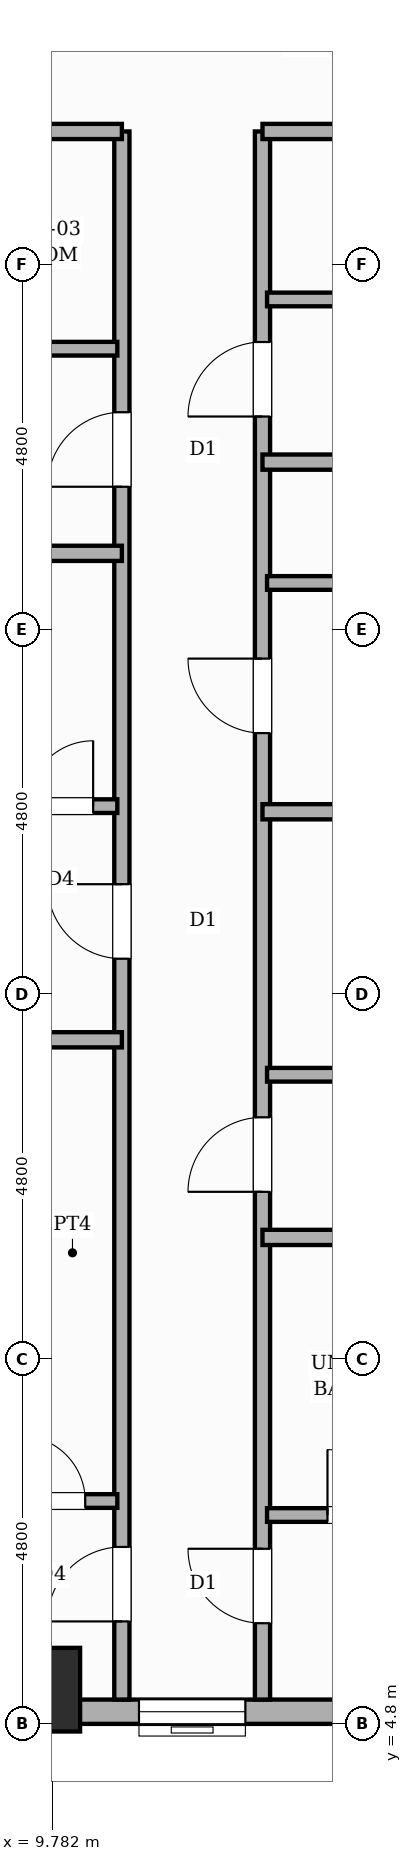
"""IFC4 building model, lengths in metres.
Left out: names, types, materials, properties, quantities, classifications, styles, units other than length and angle.
Written with IfcOpenShell. Run it as: python <this file> out.ifc"""

import sys

from ifc_helpers import new_model, si_unit, direction, frame, frame_2d, origin, origin_2d, place, context, subcontext, project, spatial, rectangle, extrude, element, fill, save


model = new_model("IFC4")
c1 = context("Model", 3, precision=1e-05, world=origin(), true_north=direction((0.0, 1.0)))
c2 = subcontext(c1, "Body", "Model", "MODEL_VIEW")
j1 = project(units=[si_unit("LENGTHUNIT", "METRE"), si_unit("PLANEANGLEUNIT", "RADIAN")], contexts=[c1])
p1 = place(None, origin())
s1 = spatial("IfcSite", under=j1, at=p1, CompositionType="ELEMENT")
p2 = place(p1, origin())
s2 = spatial("IfcBuilding", under=s1, at=p2, CompositionType="ELEMENT")
p3 = place(p2, frame((0.0, 0.0, 35.8)))
s3 = spatial("IfcBuildingStorey", under=s2, at=p3, CompositionType="ELEMENT", Elevation=35.8)
p4 = place(p3, frame((9.6, 5.25, 0.0), z_axis=(0.0, 0.0, 1.0), x_axis=(1.0, 0.0, 0.0)))
e1 = element("IfcColumn", 1, at=p4, inside=s3, PredefinedType="COLUMN", context=c2, shape_type="SweptSolid", body=[
    extrude(rectangle(XDim=1.1, YDim=1.1, at=origin_2d()), origin(), (0.0, 0.0, 1.0), 3.6),
])
p5 = place(p3, frame((21.6, 4.96, 0.0), z_axis=(0.0, 0.0, 1.0), x_axis=(-1.0, 0.0, 0.0)))
e2 = element("IfcWall", 2, at=p5, inside=s3, PredefinedType="STANDARD", context=c2, shape_type="SweptSolid", body=[
    extrude(rectangle(XDim=14.4, YDim=0.32, at=frame_2d((7.2, 0.0))), origin(), (0.0, 0.0, 1.0), 2.53),
])
p6 = place(p5, frame((12.98, 0.0, 0.45)))
e3 = element("IfcOpeningElement", 3, at=p6, cuts=e2, PredefinedType="OPENING", context=c2, shape_type="SweptSolid", body=[
    extrude(rectangle(XDim=0.95, YDim=1.8, at=frame_2d((0.475, 0.9))), frame((0.0, 0.17, 0.0), z_axis=(0.0, -1.0, 0.0), x_axis=(1.0, 0.0, 0.0)), (0.0, 0.0, 1.0), 0.34),
])
p7 = place(p5, frame((9.275, 0.0, 0.65)))
e4 = element("IfcOpeningElement", 4, at=p7, cuts=e2, PredefinedType="OPENING", context=c2, shape_type="SweptSolid", body=[
    extrude(rectangle(XDim=1.4, YDim=1.1, at=frame_2d((0.7, 0.55))), frame((0.0, 0.17, 0.0), z_axis=(0.0, -1.0, 0.0), x_axis=(1.0, 0.0, 0.0)), (0.0, 0.0, 1.0), 0.34),
])
p8 = place(p5, frame((4.812, 0.0, 0.65)))
e5 = element("IfcOpeningElement", 5, at=p8, cuts=e2, PredefinedType="OPENING", context=c2, shape_type="SweptSolid", body=[
    extrude(rectangle(XDim=1.4, YDim=1.1, at=frame_2d((0.7, 0.55))), frame((0.0, 0.17, 0.0), z_axis=(0.0, -1.0, 0.0), x_axis=(1.0, 0.0, 0.0)), (0.0, 0.0, 1.0), 0.34),
])
p9 = place(p5, frame((0.47, 0.0, 0.45)))
e6 = element("IfcOpeningElement", 6, at=p9, cuts=e2, PredefinedType="OPENING", context=c2, shape_type="SweptSolid", body=[
    extrude(rectangle(XDim=0.95, YDim=1.8, at=frame_2d((0.475, 0.9))), frame((0.0, 0.17, 0.0), z_axis=(0.0, -1.0, 0.0), x_axis=(1.0, 0.0, 0.0)), (0.0, 0.0, 1.0), 0.34),
])
p10 = place(p3, frame((10.7, 5.12, 0.0), z_axis=(0.0, 0.0, 1.0), x_axis=(0.0, 1.0, 0.0)))
e7 = element("IfcWall", 7, at=p10, inside=s3, PredefinedType="PARTITIONING", context=c2, shape_type="SweptSolid", body=[
    extrude(rectangle(XDim=20.63, YDim=0.2, at=frame_2d((10.315, 0.0))), origin(), (0.0, 0.0, 1.0), 3.35),
])
p11 = place(p10, frame((1.028, 0.0, 0.0)))
e8 = element("IfcOpeningElement", 8, at=p11, cuts=e7, PredefinedType="OPENING", context=c2, shape_type="SweptSolid", body=[
    extrude(rectangle(XDim=0.98, YDim=2.18, at=frame_2d((0.49, 1.09))), frame((0.0, 0.11, 0.0), z_axis=(0.0, -1.0, 0.0), x_axis=(1.0, 0.0, 0.0)), (0.0, 0.0, 1.0), 0.22),
])
p12 = place(p10, frame((9.747, 0.0, 0.0)))
e9 = element("IfcOpeningElement", 9, at=p12, cuts=e7, PredefinedType="OPENING", context=c2, shape_type="SweptSolid", body=[
    extrude(rectangle(XDim=0.98, YDim=2.18, at=frame_2d((0.49, 1.09))), frame((0.0, 0.11, 0.0), z_axis=(0.0, -1.0, 0.0), x_axis=(1.0, 0.0, 0.0)), (0.0, 0.0, 1.0), 0.22),
])
p13 = place(p10, frame((15.956, 0.0, 0.0)))
e10 = element("IfcOpeningElement", 10, at=p13, cuts=e7, PredefinedType="OPENING", context=c2, shape_type="SweptSolid", body=[
    extrude(rectangle(XDim=0.98, YDim=2.18, at=frame_2d((0.49, 1.09))), frame((0.0, 0.11, 0.0), z_axis=(0.0, -1.0, 0.0), x_axis=(1.0, 0.0, 0.0)), (0.0, 0.0, 1.0), 0.22),
])
p14 = place(p3, frame((12.55, 5.12, 0.0), z_axis=(0.0, 0.0, 1.0), x_axis=(0.0, 1.0, 0.0)))
e11 = element("IfcWall", 11, at=p14, inside=s3, PredefinedType="PARTITIONING", context=c2, shape_type="SweptSolid", body=[
    extrude(rectangle(XDim=20.63, YDim=0.2, at=frame_2d((10.315, 0.0))), origin(), (0.0, 0.0, 1.0), 3.35),
])
p15 = place(p14, frame((1.004, 0.0, 0.0)))
e12 = element("IfcOpeningElement", 12, at=p15, cuts=e11, PredefinedType="OPENING", context=c2, shape_type="SweptSolid", body=[
    extrude(rectangle(XDim=0.98, YDim=2.18, at=frame_2d((0.49, 1.09))), frame((0.0, 0.11, 0.0), z_axis=(0.0, -1.0, 0.0), x_axis=(1.0, 0.0, 0.0)), (0.0, 0.0, 1.0), 0.22),
])
p16 = place(p14, frame((6.68, 0.0, 0.0)))
e13 = element("IfcOpeningElement", 13, at=p16, cuts=e11, PredefinedType="OPENING", context=c2, shape_type="SweptSolid", body=[
    extrude(rectangle(XDim=0.98, YDim=2.18, at=frame_2d((0.49, 1.09))), frame((0.0, 0.11, 0.0), z_axis=(0.0, -1.0, 0.0), x_axis=(1.0, 0.0, 0.0)), (0.0, 0.0, 1.0), 0.22),
])
p17 = place(p14, frame((12.715, 0.0, 0.0)))
e14 = element("IfcOpeningElement", 14, at=p17, cuts=e11, PredefinedType="OPENING", context=c2, shape_type="SweptSolid", body=[
    extrude(rectangle(XDim=0.98, YDim=2.18, at=frame_2d((0.49, 1.09))), frame((0.0, 0.11, 0.0), z_axis=(0.0, -1.0, 0.0), x_axis=(1.0, 0.0, 0.0)), (0.0, 0.0, 1.0), 0.22),
])
p18 = place(p14, frame((16.88, 0.0, 0.0)))
e15 = element("IfcOpeningElement", 15, at=p18, cuts=e11, PredefinedType="OPENING", context=c2, shape_type="SweptSolid", body=[
    extrude(rectangle(XDim=0.98, YDim=2.18, at=frame_2d((0.49, 1.09))), frame((0.0, 0.11, 0.0), z_axis=(0.0, -1.0, 0.0), x_axis=(1.0, 0.0, 0.0)), (0.0, 0.0, 1.0), 0.22),
])
p19 = place(p3, frame((5.12, 25.75, 0.0), z_axis=(0.0, 0.0, 1.0), x_axis=(1.0, 0.0, 0.0)))
e16 = element("IfcWall", 16, at=p19, inside=s3, PredefinedType="PARTITIONING", context=c2, shape_type="SweptSolid", body=[
    extrude(rectangle(XDim=5.58, YDim=0.2, at=frame_2d((2.79, 0.0))), origin(), (0.0, 0.0, 1.0), 3.35),
])
p20 = place(p3, frame((12.55, 25.75, 0.0), z_axis=(0.0, 0.0, 1.0), x_axis=(1.0, 0.0, 0.0)))
e17 = element("IfcWall", 17, at=p20, inside=s3, PredefinedType="PARTITIONING", context=c2, shape_type="SweptSolid", body=[
    extrude(rectangle(XDim=11.13, YDim=0.2, at=frame_2d((5.565, 0.0))), origin(), (0.0, 0.0, 1.0), 3.35),
])
p21 = place(p3, frame((5.12, 7.732, 0.0), z_axis=(0.0, 0.0, 1.0), x_axis=(1.0, 0.0, 0.0)))
e18 = element("IfcWall", 18, at=p21, inside=s3, PredefinedType="PLUMBINGWALL", context=c2, shape_type="SweptSolid", body=[
    extrude(rectangle(XDim=5.52, YDim=0.18, at=frame_2d((2.76, 0.0))), origin(), (0.0, 0.0, 1.0), 3.35),
])
p22 = place(p21, frame((0.937, 0.0, 0.0)))
e19 = element("IfcOpeningElement", 19, at=p22, cuts=e18, PredefinedType="OPENING", context=c2, shape_type="SweptSolid", body=[
    extrude(rectangle(XDim=0.9, YDim=2.15, at=frame_2d((0.45, 1.075))), frame((0.0, 0.1, 0.0), z_axis=(0.0, -1.0, 0.0), x_axis=(1.0, 0.0, 0.0)), (0.0, 0.0, 1.0), 0.2),
])
p23 = place(p21, frame((2.564, 0.0, 0.0)))
e20 = element("IfcOpeningElement", 20, at=p23, cuts=e18, PredefinedType="OPENING", context=c2, shape_type="SweptSolid", body=[
    extrude(rectangle(XDim=0.9, YDim=2.15, at=frame_2d((0.45, 1.075))), frame((0.0, 0.1, 0.0), z_axis=(0.0, -1.0, 0.0), x_axis=(1.0, 0.0, 0.0)), (0.0, 0.0, 1.0), 0.2),
])
p24 = place(p21, frame((4.238, 0.0, 0.0)))
e21 = element("IfcOpeningElement", 21, at=p24, cuts=e18, PredefinedType="OPENING", context=c2, shape_type="SweptSolid", body=[
    extrude(rectangle(XDim=0.86, YDim=2.1, at=frame_2d((0.43, 1.05))), frame((0.0, 0.1, 0.0), z_axis=(0.0, -1.0, 0.0), x_axis=(1.0, 0.0, 0.0)), (0.0, 0.0, 1.0), 0.2),
])
p25 = place(p3, frame((5.12, 13.8, 0.0), z_axis=(0.0, 0.0, 1.0), x_axis=(1.0, 0.0, 0.0)))
e22 = element("IfcWall", 22, at=p25, inside=s3, PredefinedType="SOLIDWALL", context=c2, shape_type="SweptSolid", body=[
    extrude(rectangle(XDim=5.58, YDim=0.2, at=frame_2d((2.79, 0.0))), origin(), (0.0, 0.0, 1.0), 3.35),
])
p26 = place(p3, frame((5.12, 16.874, 0.0), z_axis=(0.0, 0.0, 1.0), x_axis=(1.0, 0.0, 0.0)))
e23 = element("IfcWall", 23, at=p26, inside=s3, PredefinedType="PLUMBINGWALL", context=c2, shape_type="SweptSolid", body=[
    extrude(rectangle(XDim=5.52, YDim=0.18, at=frame_2d((2.76, 0.0))), origin(), (0.0, 0.0, 1.0), 3.35),
])
p27 = place(p26, frame((0.472, 0.0, 0.0)))
e24 = element("IfcOpeningElement", 24, at=p27, cuts=e23, PredefinedType="OPENING", context=c2, shape_type="SweptSolid", body=[
    extrude(rectangle(XDim=0.9, YDim=2.15, at=frame_2d((0.45, 1.075))), frame((0.0, 0.1, 0.0), z_axis=(0.0, -1.0, 0.0), x_axis=(1.0, 0.0, 0.0)), (0.0, 0.0, 1.0), 0.2),
])
p28 = place(p26, frame((2.655, 0.0, 0.0)))
e25 = element("IfcOpeningElement", 25, at=p28, cuts=e23, PredefinedType="OPENING", context=c2, shape_type="SweptSolid", body=[
    extrude(rectangle(XDim=0.9, YDim=2.15, at=frame_2d((0.45, 1.075))), frame((0.0, 0.1, 0.0), z_axis=(0.0, -1.0, 0.0), x_axis=(1.0, 0.0, 0.0)), (0.0, 0.0, 1.0), 0.2),
])
p29 = place(p26, frame((4.342, 0.0, 0.0)))
e26 = element("IfcOpeningElement", 26, at=p29, cuts=e23, PredefinedType="OPENING", context=c2, shape_type="SweptSolid", body=[
    extrude(rectangle(XDim=0.86, YDim=2.1, at=frame_2d((0.43, 1.05))), frame((0.0, 0.1, 0.0), z_axis=(0.0, -1.0, 0.0), x_axis=(1.0, 0.0, 0.0)), (0.0, 0.0, 1.0), 0.2),
])
p30 = place(p3, frame((5.12, 20.2, 0.0), z_axis=(0.0, 0.0, 1.0), x_axis=(1.0, 0.0, 0.0)))
e27 = element("IfcWall", 27, at=p30, inside=s3, PredefinedType="SOLIDWALL", context=c2, shape_type="SweptSolid", body=[
    extrude(rectangle(XDim=5.58, YDim=0.2, at=frame_2d((2.79, 0.0))), origin(), (0.0, 0.0, 1.0), 3.35),
])
p31 = place(p3, frame((5.12, 22.892, 0.0), z_axis=(0.0, 0.0, 1.0), x_axis=(1.0, 0.0, 0.0)))
e28 = element("IfcWall", 28, at=p31, inside=s3, PredefinedType="PLUMBINGWALL", context=c2, shape_type="SweptSolid", body=[
    extrude(rectangle(XDim=5.52, YDim=0.18, at=frame_2d((2.76, 0.0))), origin(), (0.0, 0.0, 1.0), 3.35),
])
p32 = place(p31, frame((0.916, 0.0, 0.0)))
e29 = element("IfcOpeningElement", 29, at=p32, cuts=e28, PredefinedType="OPENING", context=c2, shape_type="SweptSolid", body=[
    extrude(rectangle(XDim=0.86, YDim=2.1, at=frame_2d((0.43, 1.05))), frame((0.0, 0.1, 0.0), z_axis=(0.0, -1.0, 0.0), x_axis=(1.0, 0.0, 0.0)), (0.0, 0.0, 1.0), 0.2),
])
p33 = place(p31, frame((3.606, 0.0, 0.0)))
e30 = element("IfcOpeningElement", 30, at=p33, cuts=e28, PredefinedType="OPENING", context=c2, shape_type="SweptSolid", body=[
    extrude(rectangle(XDim=0.86, YDim=2.1, at=frame_2d((0.43, 1.05))), frame((0.0, 0.1, 0.0), z_axis=(0.0, -1.0, 0.0), x_axis=(1.0, 0.0, 0.0)), (0.0, 0.0, 1.0), 0.2),
])
p34 = place(p3, frame((12.61, 7.548, 0.0), z_axis=(0.0, 0.0, 1.0), x_axis=(1.0, 0.0, 0.0)))
e31 = element("IfcWall", 31, at=p34, inside=s3, PredefinedType="PLUMBINGWALL", context=c2, shape_type="SweptSolid", body=[
    extrude(rectangle(XDim=11.07, YDim=0.18, at=frame_2d((5.535, 0.0))), origin(), (0.0, 0.0, 1.0), 3.35),
])
p35 = place(p34, frame((0.795, 0.0, 0.0)))
e32 = element("IfcOpeningElement", 32, at=p35, cuts=e31, PredefinedType="OPENING", context=c2, shape_type="SweptSolid", body=[
    extrude(rectangle(XDim=0.86, YDim=2.1, at=frame_2d((0.43, 1.05))), frame((0.0, 0.1, 0.0), z_axis=(0.0, -1.0, 0.0), x_axis=(1.0, 0.0, 0.0)), (0.0, 0.0, 1.0), 0.2),
])
p36 = place(p34, frame((3.414, 0.0, 0.0)))
e33 = element("IfcOpeningElement", 33, at=p36, cuts=e31, PredefinedType="OPENING", context=c2, shape_type="SweptSolid", body=[
    extrude(rectangle(XDim=0.9, YDim=2.15, at=frame_2d((0.45, 1.075))), frame((0.0, 0.1, 0.0), z_axis=(0.0, -1.0, 0.0), x_axis=(1.0, 0.0, 0.0)), (0.0, 0.0, 1.0), 0.2),
])
p37 = place(p34, frame((7.964, 0.0, 0.0)))
e34 = element("IfcOpeningElement", 34, at=p37, cuts=e31, PredefinedType="OPENING", context=c2, shape_type="SweptSolid", body=[
    extrude(rectangle(XDim=0.9, YDim=2.15, at=frame_2d((0.45, 1.075))), frame((0.0, 0.1, 0.0), z_axis=(0.0, -1.0, 0.0), x_axis=(1.0, 0.0, 0.0)), (0.0, 0.0, 1.0), 0.2),
])
p38 = place(p3, frame((12.55, 11.2, 0.0), z_axis=(0.0, 0.0, 1.0), x_axis=(1.0, 0.0, 0.0)))
e35 = element("IfcWall", 35, at=p38, inside=s3, PredefinedType="SOLIDWALL", context=c2, shape_type="SweptSolid", body=[
    extrude(rectangle(XDim=11.13, YDim=0.2, at=frame_2d((5.565, 0.0))), origin(), (0.0, 0.0, 1.0), 3.35),
])
p39 = place(p3, frame((12.61, 13.34, 0.0), z_axis=(0.0, 0.0, 1.0), x_axis=(1.0, 0.0, 0.0)))
e36 = element("IfcWall", 36, at=p39, inside=s3, PredefinedType="PLUMBINGWALL", context=c2, shape_type="SweptSolid", body=[
    extrude(rectangle(XDim=11.07, YDim=0.18, at=frame_2d((5.535, 0.0))), origin(), (0.0, 0.0, 1.0), 3.35),
])
p40 = place(p39, frame((2.319, 0.0, 0.0)))
e37 = element("IfcOpeningElement", 37, at=p40, cuts=e36, PredefinedType="OPENING", context=c2, shape_type="SweptSolid", body=[
    extrude(rectangle(XDim=0.86, YDim=2.1, at=frame_2d((0.43, 1.05))), frame((0.0, 0.1, 0.0), z_axis=(0.0, -1.0, 0.0), x_axis=(1.0, 0.0, 0.0)), (0.0, 0.0, 1.0), 0.2),
])
p41 = place(p39, frame((7.934, 0.0, 0.0)))
e38 = element("IfcOpeningElement", 38, at=p41, cuts=e36, PredefinedType="OPENING", context=c2, shape_type="SweptSolid", body=[
    extrude(rectangle(XDim=0.86, YDim=2.1, at=frame_2d((0.43, 1.05))), frame((0.0, 0.1, 0.0), z_axis=(0.0, -1.0, 0.0), x_axis=(1.0, 0.0, 0.0)), (0.0, 0.0, 1.0), 0.2),
])
p42 = place(p3, frame((12.55, 16.8, 0.0), z_axis=(0.0, 0.0, 1.0), x_axis=(1.0, 0.0, 0.0)))
e39 = element("IfcWall", 39, at=p42, inside=s3, PredefinedType="SOLIDWALL", context=c2, shape_type="SweptSolid", body=[
    extrude(rectangle(XDim=11.13, YDim=0.2, at=frame_2d((5.565, 0.0))), origin(), (0.0, 0.0, 1.0), 3.35),
])
p43 = place(p3, frame((12.61, 19.81, 0.0), z_axis=(0.0, 0.0, 1.0), x_axis=(1.0, 0.0, 0.0)))
e40 = element("IfcWall", 40, at=p43, inside=s3, PredefinedType="PLUMBINGWALL", context=c2, shape_type="SweptSolid", body=[
    extrude(rectangle(XDim=11.07, YDim=0.18, at=frame_2d((5.535, 0.0))), origin(), (0.0, 0.0, 1.0), 3.35),
])
p44 = place(p43, frame((2.319, 0.0, 0.0)))
e41 = element("IfcOpeningElement", 41, at=p44, cuts=e40, PredefinedType="OPENING", context=c2, shape_type="SweptSolid", body=[
    extrude(rectangle(XDim=0.86, YDim=2.1, at=frame_2d((0.43, 1.05))), frame((0.0, 0.1, 0.0), z_axis=(0.0, -1.0, 0.0), x_axis=(1.0, 0.0, 0.0)), (0.0, 0.0, 1.0), 0.2),
])
p45 = place(p43, frame((7.934, 0.0, 0.0)))
e42 = element("IfcOpeningElement", 42, at=p45, cuts=e40, PredefinedType="OPENING", context=c2, shape_type="SweptSolid", body=[
    extrude(rectangle(XDim=0.86, YDim=2.1, at=frame_2d((0.43, 1.05))), frame((0.0, 0.1, 0.0), z_axis=(0.0, -1.0, 0.0), x_axis=(1.0, 0.0, 0.0)), (0.0, 0.0, 1.0), 0.2),
])
p46 = place(p3, frame((12.55, 21.4, 0.0), z_axis=(0.0, 0.0, 1.0), x_axis=(1.0, 0.0, 0.0)))
e43 = element("IfcWall", 43, at=p46, inside=s3, PredefinedType="SOLIDWALL", context=c2, shape_type="SweptSolid", body=[
    extrude(rectangle(XDim=11.13, YDim=0.2, at=frame_2d((5.565, 0.0))), origin(), (0.0, 0.0, 1.0), 3.35),
])
p47 = place(p3, frame((12.61, 23.54, 0.0), z_axis=(0.0, 0.0, 1.0), x_axis=(1.0, 0.0, 0.0)))
e44 = element("IfcWall", 44, at=p47, inside=s3, PredefinedType="PLUMBINGWALL", context=c2, shape_type="SweptSolid", body=[
    extrude(rectangle(XDim=11.07, YDim=0.18, at=frame_2d((5.535, 0.0))), origin(), (0.0, 0.0, 1.0), 3.35),
])
p48 = place(p47, frame((2.319, 0.0, 0.0)))
e45 = element("IfcOpeningElement", 45, at=p48, cuts=e44, PredefinedType="OPENING", context=c2, shape_type="SweptSolid", body=[
    extrude(rectangle(XDim=0.86, YDim=2.1, at=frame_2d((0.43, 1.05))), frame((0.0, 0.1, 0.0), z_axis=(0.0, -1.0, 0.0), x_axis=(1.0, 0.0, 0.0)), (0.0, 0.0, 1.0), 0.2),
])
p49 = place(p47, frame((7.934, 0.0, 0.0)))
e46 = element("IfcOpeningElement", 46, at=p49, cuts=e44, PredefinedType="OPENING", context=c2, shape_type="SweptSolid", body=[
    extrude(rectangle(XDim=0.86, YDim=2.1, at=frame_2d((0.43, 1.05))), frame((0.0, 0.1, 0.0), z_axis=(0.0, -1.0, 0.0), x_axis=(1.0, 0.0, 0.0)), (0.0, 0.0, 1.0), 0.2),
])
p50 = place(p7, origin())
e47 = element("IfcWindow", 47, at=p50, inside=s3, PartitioningType="SINGLE_PANEL", PredefinedType="WINDOW", context=c2, shape_type="SweptSolid", body=[
    extrude(rectangle(XDim=1.4, YDim=1.1, at=frame_2d((0.7, 0.55))), frame((0.0, 0.03, 0.0), z_axis=(0.0, -1.0, 0.0), x_axis=(1.0, 0.0, 0.0)), (0.0, 0.0, 1.0), 0.06),
])
fill(e4, e47)
p51 = place(p11, origin())
e48 = element("IfcDoor", 48, at=p51, inside=s3, OperationType="SINGLE_SWING_LEFT", PredefinedType="DOOR", context=c2, shape_type="SweptSolid", body=[
    extrude(rectangle(XDim=0.98, YDim=2.18, at=frame_2d((0.49, 1.09))), frame((0.0, 0.025, 0.0), z_axis=(0.0, -1.0, 0.0), x_axis=(1.0, 0.0, 0.0)), (0.0, 0.0, 1.0), 0.05),
])
fill(e8, e48)
p52 = place(p24, origin())
e49 = element("IfcDoor", 49, at=p52, inside=s3, OperationType="SINGLE_SWING_LEFT", PredefinedType="DOOR", context=c2, shape_type="SweptSolid", body=[
    extrude(rectangle(XDim=0.86, YDim=2.1, at=frame_2d((0.43, 1.05))), frame((0.0, 0.025, 0.0), z_axis=(0.0, -1.0, 0.0), x_axis=(1.0, 0.0, 0.0)), (0.0, 0.0, 1.0), 0.05),
])
fill(e21, e49)
p53 = place(p12, origin())
e50 = element("IfcDoor", 50, at=p53, inside=s3, OperationType="SINGLE_SWING_RIGHT", PredefinedType="DOOR", context=c2, shape_type="SweptSolid", body=[
    extrude(rectangle(XDim=0.98, YDim=2.18, at=frame_2d((0.49, 1.09))), frame((0.0, 0.025, 0.0), z_axis=(0.0, -1.0, 0.0), x_axis=(1.0, 0.0, 0.0)), (0.0, 0.0, 1.0), 0.05),
])
fill(e9, e50)
p54 = place(p29, origin())
e51 = element("IfcDoor", 51, at=p54, inside=s3, OperationType="SINGLE_SWING_RIGHT", PredefinedType="DOOR", context=c2, shape_type="SweptSolid", body=[
    extrude(rectangle(XDim=0.86, YDim=2.1, at=frame_2d((0.43, 1.05))), frame((0.0, 0.025, 0.0), z_axis=(0.0, -1.0, 0.0), x_axis=(1.0, 0.0, 0.0)), (0.0, 0.0, 1.0), 0.05),
])
fill(e26, e51)
p55 = place(p13, origin())
e52 = element("IfcDoor", 52, at=p55, inside=s3, OperationType="SINGLE_SWING_LEFT", PredefinedType="DOOR", context=c2, shape_type="SweptSolid", body=[
    extrude(rectangle(XDim=0.98, YDim=2.18, at=frame_2d((0.49, 1.09))), frame((0.0, 0.025, 0.0), z_axis=(0.0, -1.0, 0.0), x_axis=(1.0, 0.0, 0.0)), (0.0, 0.0, 1.0), 0.05),
])
fill(e10, e52)
p56 = place(p15, origin())
e53 = element("IfcDoor", 53, at=p56, inside=s3, OperationType="SINGLE_SWING_RIGHT", PredefinedType="DOOR", context=c2, shape_type="SweptSolid", body=[
    extrude(rectangle(XDim=0.98, YDim=2.18, at=frame_2d((0.49, 1.09))), frame((0.0, 0.025, 0.0), z_axis=(0.0, -1.0, 0.0), x_axis=(1.0, 0.0, 0.0)), (0.0, 0.0, 1.0), 0.05),
])
fill(e12, e53)
p57 = place(p35, origin())
e54 = element("IfcDoor", 54, at=p57, inside=s3, OperationType="SINGLE_SWING_LEFT", PredefinedType="DOOR", context=c2, shape_type="SweptSolid", body=[
    extrude(rectangle(XDim=0.86, YDim=2.1, at=frame_2d((0.43, 1.05))), frame((0.0, 0.025, 0.0), z_axis=(0.0, -1.0, 0.0), x_axis=(1.0, 0.0, 0.0)), (0.0, 0.0, 1.0), 0.05),
])
fill(e32, e54)
p58 = place(p16, origin())
e55 = element("IfcDoor", 55, at=p58, inside=s3, OperationType="SINGLE_SWING_LEFT", PredefinedType="DOOR", context=c2, shape_type="SweptSolid", body=[
    extrude(rectangle(XDim=0.98, YDim=2.18, at=frame_2d((0.49, 1.09))), frame((0.0, 0.025, 0.0), z_axis=(0.0, -1.0, 0.0), x_axis=(1.0, 0.0, 0.0)), (0.0, 0.0, 1.0), 0.05),
])
fill(e13, e55)
p59 = place(p17, origin())
e56 = element("IfcDoor", 56, at=p59, inside=s3, OperationType="SINGLE_SWING_RIGHT", PredefinedType="DOOR", context=c2, shape_type="SweptSolid", body=[
    extrude(rectangle(XDim=0.98, YDim=2.18, at=frame_2d((0.49, 1.09))), frame((0.0, 0.025, 0.0), z_axis=(0.0, -1.0, 0.0), x_axis=(1.0, 0.0, 0.0)), (0.0, 0.0, 1.0), 0.05),
])
fill(e14, e56)
p60 = place(p18, origin())
e57 = element("IfcDoor", 57, at=p60, inside=s3, OperationType="SINGLE_SWING_LEFT", PredefinedType="DOOR", context=c2, shape_type="SweptSolid", body=[
    extrude(rectangle(XDim=0.98, YDim=2.18, at=frame_2d((0.49, 1.09))), frame((0.0, 0.025, 0.0), z_axis=(0.0, -1.0, 0.0), x_axis=(1.0, 0.0, 0.0)), (0.0, 0.0, 1.0), 0.05),
])
fill(e15, e57)
save(model, sys.argv[1])
